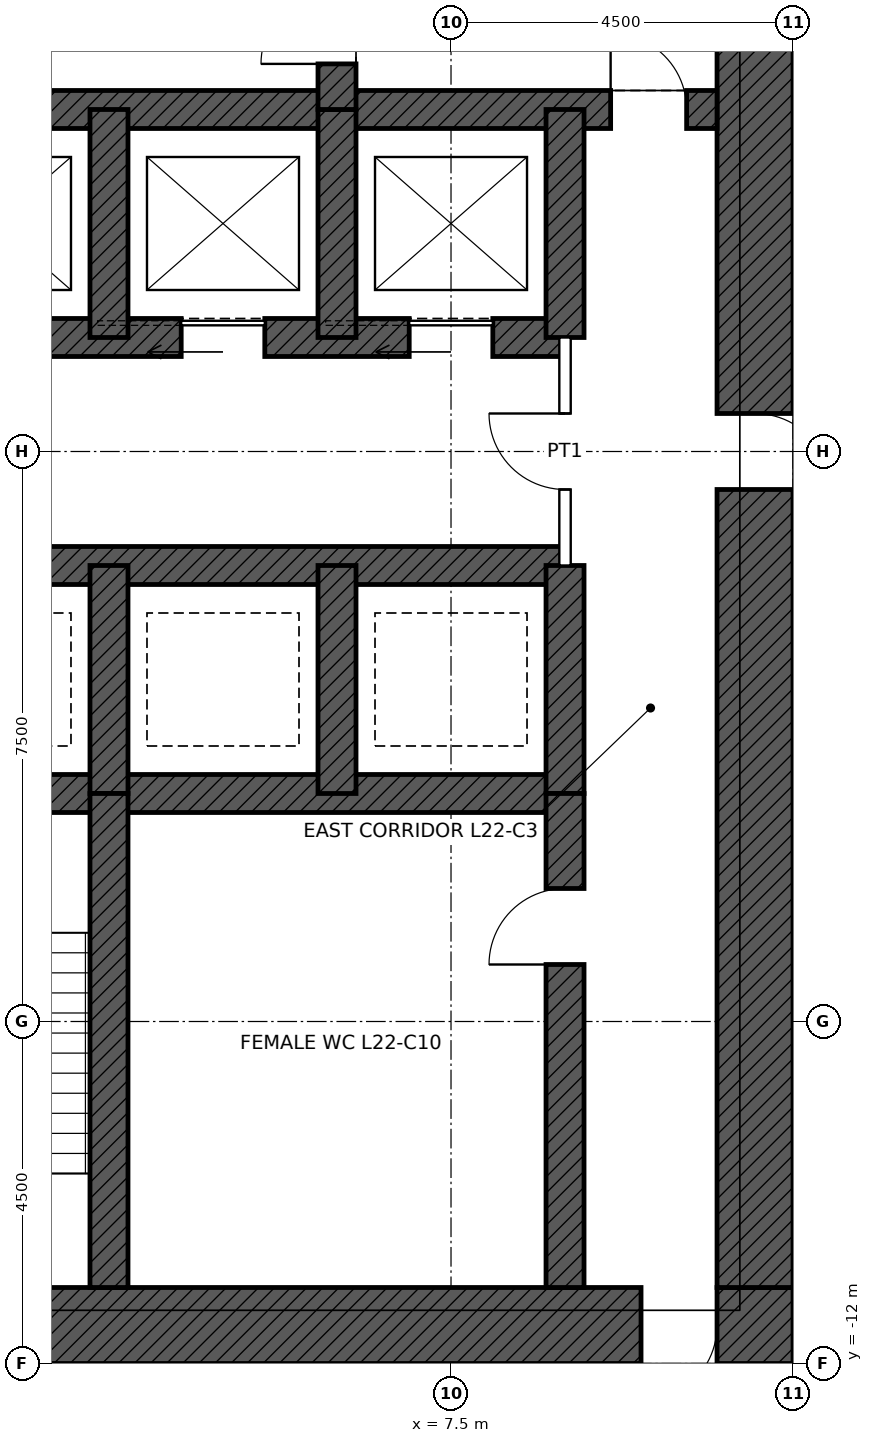
"""IFC4 building model, lengths in metres.
Left out: names, types, materials, properties, quantities, classifications, styles, units other than length and angle.
Written with IfcOpenShell. Run it as: python <this file> out.ifc"""

import sys

from ifc_helpers import new_model, si_unit, direction, frame, frame_2d, origin, place, context, subcontext, project, spatial, rectangle, extrude, element, fill, save


model = new_model("IFC4")
c1 = context("Model", 3, precision=1e-05, world=origin(), true_north=direction((0.0, 1.0)))
c2 = subcontext(c1, "Body", "Model", "MODEL_VIEW")
j1 = project(units=[si_unit("LENGTHUNIT", "METRE"), si_unit("PLANEANGLEUNIT", "RADIAN")], contexts=[c1])
p1 = place(None, origin())
s1 = spatial("IfcSite", under=j1, at=p1, CompositionType="ELEMENT")
p2 = place(p1, origin())
s2 = spatial("IfcBuilding", under=s1, at=p2, CompositionType="ELEMENT")
p3 = place(p2, frame((0.0, 0.0, 113.4)))
s3 = spatial("IfcBuildingStorey", under=s2, at=p3, CompositionType="ELEMENT", Elevation=113.4)
p4 = place(p3, frame((12.0, -11.5, 0.0), z_axis=(0.0, 0.0, 1.0), x_axis=(-1.0, 0.0, 0.0)))
e1 = element("IfcWall", 1, at=p4, inside=s3, PredefinedType="SHEAR", context=c2, shape_type="SweptSolid", body=[
    extrude(rectangle(XDim=24.0, YDim=1.0, at=frame_2d((12.0, 0.0))), origin(), (0.0, 0.0, 1.0), 4.5),
])
p5 = place(p4, frame((11.5, 0.0, 0.0)))
e2 = element("IfcOpeningElement", 2, at=p5, cuts=e1, PredefinedType="OPENING", context=c2, shape_type="SweptSolid", body=[
    extrude(rectangle(XDim=1.0, YDim=2.1, at=frame_2d((0.5, 1.05))), frame((0.0, 0.51, 0.0), z_axis=(0.0, -1.0, 0.0), x_axis=(1.0, 0.0, 0.0)), (0.0, 0.0, 1.0), 1.02),
])
p6 = place(p4, frame((1.0, 0.0, 0.0)))
e3 = element("IfcOpeningElement", 3, at=p6, cuts=e1, PredefinedType="OPENING", context=c2, shape_type="SweptSolid", body=[
    extrude(rectangle(XDim=1.0, YDim=2.4, at=frame_2d((0.5, 1.2))), frame((0.0, 0.51, 0.0), z_axis=(0.0, -1.0, 0.0), x_axis=(1.0, 0.0, 0.0)), (0.0, 0.0, 1.0), 1.02),
])
p7 = place(p3, frame((11.5, 11.0, 0.0), z_axis=(0.0, 0.0, 1.0), x_axis=(0.0, -1.0, 0.0)))
e4 = element("IfcWall", 4, at=p7, inside=s3, PredefinedType="SHEAR", context=c2, shape_type="SweptSolid", body=[
    extrude(rectangle(XDim=22.0, YDim=1.0, at=frame_2d((11.0, 0.0))), origin(), (0.0, 0.0, 1.0), 4.5),
])
p8 = place(p7, frame((10.5, 0.0, 0.0)))
e5 = element("IfcOpeningElement", 5, at=p8, cuts=e4, PredefinedType="OPENING", context=c2, shape_type="SweptSolid", body=[
    extrude(rectangle(XDim=1.0, YDim=2.4, at=frame_2d((0.5, 1.2))), frame((0.0, 0.51, 0.0), z_axis=(0.0, -1.0, 0.0), x_axis=(1.0, 0.0, 0.0)), (0.0, 0.0, 1.0), 1.02),
])
p9 = place(p3, frame((-11.0, 4.5, 0.0), z_axis=(0.0, 0.0, 1.0), x_axis=(1.0, 0.0, 0.0)))
e6 = element("IfcWall", 6, at=p9, inside=s3, PredefinedType="SHEAR", context=c2, shape_type="SweptSolid", body=[
    extrude(rectangle(XDim=22.0, YDim=0.5, at=frame_2d((11.0, 0.0))), origin(), (0.0, 0.0, 1.0), 4.5),
])
p10 = place(p9, frame((0.4, 0.0, 0.0)))
e7 = element("IfcOpeningElement", 7, at=p10, cuts=e6, PredefinedType="OPENING", context=c2, shape_type="SweptSolid", body=[
    extrude(rectangle(XDim=1.0, YDim=2.1, at=frame_2d((0.5, 1.05))), frame((0.0, 0.26, 0.0), z_axis=(0.0, -1.0, 0.0), x_axis=(1.0, 0.0, 0.0)), (0.0, 0.0, 1.0), 0.52),
])
p11 = place(p9, frame((20.6, 0.0, 0.0)))
e8 = element("IfcOpeningElement", 8, at=p11, cuts=e6, PredefinedType="OPENING", context=c2, shape_type="SweptSolid", body=[
    extrude(rectangle(XDim=1.0, YDim=2.1, at=frame_2d((0.5, 1.05))), frame((0.0, 0.26, 0.0), z_axis=(0.0, -1.0, 0.0), x_axis=(1.0, 0.0, 0.0)), (0.0, 0.0, 1.0), 0.52),
])
p12 = place(p3, frame((-9.0, 1.5, 0.0), z_axis=(0.0, 0.0, 1.0), x_axis=(1.0, 0.0, 0.0)))
e9 = element("IfcWall", 9, at=p12, inside=s3, PredefinedType="SHEAR", context=c2, shape_type="SweptSolid", body=[
    extrude(rectangle(XDim=18.0, YDim=0.5, at=frame_2d((9.0, 0.0))), origin(), (0.0, 0.0, 1.0), 4.5),
])
p13 = place(p12, frame((9.95, 0.0, 0.0)))
e10 = element("IfcOpeningElement", 10, at=p13, cuts=e9, PredefinedType="OPENING", context=c2, shape_type="SweptSolid", body=[
    extrude(rectangle(XDim=1.1, YDim=2.1, at=frame_2d((0.55, 1.05))), frame((0.0, 0.26, 0.0), z_axis=(0.0, -1.0, 0.0), x_axis=(1.0, 0.0, 0.0)), (0.0, 0.0, 1.0), 0.52),
])
p14 = place(p12, frame((12.95, 0.0, 0.0)))
e11 = element("IfcOpeningElement", 11, at=p14, cuts=e9, PredefinedType="OPENING", context=c2, shape_type="SweptSolid", body=[
    extrude(rectangle(XDim=1.1, YDim=2.1, at=frame_2d((0.55, 1.05))), frame((0.0, 0.26, 0.0), z_axis=(0.0, -1.0, 0.0), x_axis=(1.0, 0.0, 0.0)), (0.0, 0.0, 1.0), 0.52),
])
p15 = place(p12, frame((15.95, 0.0, 0.0)))
e12 = element("IfcOpeningElement", 12, at=p15, cuts=e9, PredefinedType="OPENING", context=c2, shape_type="SweptSolid", body=[
    extrude(rectangle(XDim=1.1, YDim=2.1, at=frame_2d((0.55, 1.05))), frame((0.0, 0.26, 0.0), z_axis=(0.0, -1.0, 0.0), x_axis=(1.0, 0.0, 0.0)), (0.0, 0.0, 1.0), 0.52),
])
p16 = place(p12, frame((0.95, 0.0, 0.0)))
e13 = element("IfcOpeningElement", 13, at=p16, cuts=e9, PredefinedType="OPENING", context=c2, shape_type="SweptSolid", body=[
    extrude(rectangle(XDim=1.1, YDim=2.1, at=frame_2d((0.55, 1.05))), frame((0.0, 0.26, 0.0), z_axis=(0.0, -1.0, 0.0), x_axis=(1.0, 0.0, 0.0)), (0.0, 0.0, 1.0), 0.52),
])
p17 = place(p12, frame((3.95, 0.0, 0.0)))
e14 = element("IfcOpeningElement", 14, at=p17, cuts=e9, PredefinedType="OPENING", context=c2, shape_type="SweptSolid", body=[
    extrude(rectangle(XDim=1.1, YDim=2.1, at=frame_2d((0.55, 1.05))), frame((0.0, 0.26, 0.0), z_axis=(0.0, -1.0, 0.0), x_axis=(1.0, 0.0, 0.0)), (0.0, 0.0, 1.0), 0.52),
])
p18 = place(p12, frame((6.95, 0.0, 0.0)))
e15 = element("IfcOpeningElement", 15, at=p18, cuts=e9, PredefinedType="OPENING", context=c2, shape_type="SweptSolid", body=[
    extrude(rectangle(XDim=1.1, YDim=2.1, at=frame_2d((0.55, 1.05))), frame((0.0, 0.26, 0.0), z_axis=(0.0, -1.0, 0.0), x_axis=(1.0, 0.0, 0.0)), (0.0, 0.0, 1.0), 0.52),
])
for number, where, z_axis, x_axis in (
    (16, (-9.0, -1.5, 0.0), (0.0, 0.0, 1.0), (1.0, 0.0, 0.0)),
    (17, (-9.0, -4.5, 0.0), (0.0, 0.0, 1.0), (1.0, 0.0, 0.0)),
):
    element("IfcWall", number, at=place(p3, frame(where, z_axis=z_axis, x_axis=x_axis)), inside=s3, PredefinedType="SHEAR", context=c2, shape_type="SweptSolid", body=[
        extrude(rectangle(XDim=18.0, YDim=0.5, at=frame_2d((9.0, 0.0))), origin(), (0.0, 0.0, 1.0), 4.5),
    ])
for number, where, z_axis, x_axis in (
    (18, (9.0, 1.5, 0.0), (0.0, 0.0, 1.0), (0.0, 1.0, 0.0)),
    (19, (9.0, -4.5, 0.0), (0.0, 0.0, 1.0), (0.0, 1.0, 0.0)),
    (20, (3.0, 1.5, 0.0), (0.0, 0.0, 1.0), (0.0, 1.0, 0.0)),
    (21, (6.0, 1.5, 0.0), (0.0, 0.0, 1.0), (0.0, 1.0, 0.0)),
    (22, (3.0, -4.5, 0.0), (0.0, 0.0, 1.0), (0.0, 1.0, 0.0)),
    (23, (6.0, -4.5, 0.0), (0.0, 0.0, 1.0), (0.0, 1.0, 0.0)),
):
    element("IfcWall", number, at=place(p3, frame(where, z_axis=z_axis, x_axis=x_axis)), inside=s3, PredefinedType="SHEAR", context=c2, shape_type="SweptSolid", body=[
        extrude(rectangle(XDim=3.0, YDim=0.5, at=frame_2d((1.5, 0.0))), origin(), (0.0, 0.0, 1.0), 4.5),
    ])
p19 = place(p3, frame((6.0, 4.5, 0.0), z_axis=(0.0, 0.0, 1.0), x_axis=(0.0, 1.0, 0.0)))
e24 = element("IfcWall", 24, at=p19, inside=s3, PredefinedType="SHEAR", context=c2, shape_type="SweptSolid", body=[
    extrude(rectangle(XDim=6.5, YDim=0.5, at=frame_2d((3.25, 0.0))), origin(), (0.0, 0.0, 1.0), 4.5),
])
p20 = place(p19, frame((0.6, 0.0, 0.0)))
e25 = element("IfcOpeningElement", 25, at=p20, cuts=e24, PredefinedType="OPENING", context=c2, shape_type="SweptSolid", body=[
    extrude(rectangle(XDim=1.0, YDim=2.1, at=frame_2d((0.5, 1.05))), frame((0.0, 0.26, 0.0), z_axis=(0.0, -1.0, 0.0), x_axis=(1.0, 0.0, 0.0)), (0.0, 0.0, 1.0), 0.52),
])
p21 = place(p3, frame((9.0, -11.0, 0.0), z_axis=(0.0, 0.0, 1.0), x_axis=(0.0, 1.0, 0.0)))
e26 = element("IfcWall", 26, at=p21, inside=s3, PredefinedType="SHEAR", context=c2, shape_type="SweptSolid", body=[
    extrude(rectangle(XDim=6.5, YDim=0.5, at=frame_2d((3.25, 0.0))), origin(), (0.0, 0.0, 1.0), 4.5),
])
p22 = place(p21, frame((4.25, 0.0, 0.0)))
e27 = element("IfcOpeningElement", 27, at=p22, cuts=e26, PredefinedType="OPENING", context=c2, shape_type="SweptSolid", body=[
    extrude(rectangle(XDim=1.0, YDim=2.1, at=frame_2d((0.5, 1.05))), frame((0.0, 0.26, 0.0), z_axis=(0.0, -1.0, 0.0), x_axis=(1.0, 0.0, 0.0)), (0.0, 0.0, 1.0), 0.52),
])
p23 = place(p3, frame((3.0, -11.0, 0.0), z_axis=(0.0, 0.0, 1.0), x_axis=(0.0, 1.0, 0.0)))
e28 = element("IfcWall", 28, at=p23, inside=s3, PredefinedType="SHEAR", context=c2, shape_type="SweptSolid", body=[
    extrude(rectangle(XDim=6.5, YDim=0.5, at=frame_2d((3.25, 0.0))), origin(), (0.0, 0.0, 1.0), 4.5),
])
p24 = place(p3, frame((9.0, -1.5, 0.0), z_axis=(0.0, 0.0, 1.0), x_axis=(0.0, 1.0, 0.0)))
e29 = element("IfcWall", 29, at=p24, inside=s3, PredefinedType="PARTITIONING", context=c2, shape_type="SweptSolid", body=[
    extrude(rectangle(XDim=3.0, YDim=0.15, at=frame_2d((1.5, 0.0))), origin(), (0.0, 0.0, 1.0), 4.25),
])
p25 = place(p24, frame((1.0, 0.0, 0.0)))
e30 = element("IfcOpeningElement", 30, at=p25, cuts=e29, PredefinedType="OPENING", context=c2, shape_type="SweptSolid", body=[
    extrude(rectangle(XDim=1.0, YDim=2.4, at=frame_2d((0.5, 1.2))), frame((0.0, 0.085, 0.0), z_axis=(0.0, -1.0, 0.0), x_axis=(1.0, 0.0, 0.0)), (0.0, 0.0, 1.0), 0.17),
])
p26 = place(p11, origin())
e31 = element("IfcDoor", 31, at=p26, inside=s3, OperationType="SINGLE_SWING_LEFT", PredefinedType="DOOR", context=c2, shape_type="SweptSolid", body=[
    extrude(rectangle(XDim=1.0, YDim=2.1, at=frame_2d((0.5, 1.05))), frame((0.0, 0.025, 0.0), z_axis=(0.0, -1.0, 0.0), x_axis=(1.0, 0.0, 0.0)), (0.0, 0.0, 1.0), 0.05),
])
fill(e8, e31)
p27 = place(p20, origin())
e32 = element("IfcDoor", 32, at=p27, inside=s3, OperationType="SINGLE_SWING_LEFT", PredefinedType="DOOR", context=c2, shape_type="SweptSolid", body=[
    extrude(rectangle(XDim=1.0, YDim=2.1, at=frame_2d((0.5, 1.05))), frame((0.0, 0.025, 0.0), z_axis=(0.0, -1.0, 0.0), x_axis=(1.0, 0.0, 0.0)), (0.0, 0.0, 1.0), 0.05),
])
fill(e25, e32)
p28 = place(p8, origin())
e33 = element("IfcDoor", 33, at=p28, inside=s3, OperationType="SINGLE_SWING_RIGHT", PredefinedType="DOOR", context=c2, shape_type="SweptSolid", body=[
    extrude(rectangle(XDim=1.0, YDim=2.4, at=frame_2d((0.5, 1.2))), frame((0.0, 0.485, 0.0), z_axis=(0.0, -1.0, 0.0), x_axis=(1.0, 0.0, 0.0)), (0.0, 0.0, 1.0), 0.05),
])
fill(e5, e33)
p29 = place(p6, origin())
e34 = element("IfcDoor", 34, at=p29, inside=s3, OperationType="SINGLE_SWING_RIGHT", PredefinedType="DOOR", context=c2, shape_type="SweptSolid", body=[
    extrude(rectangle(XDim=1.0, YDim=2.4, at=frame_2d((0.5, 1.2))), frame((0.0, 0.485, 0.0), z_axis=(0.0, -1.0, 0.0), x_axis=(1.0, 0.0, 0.0)), (0.0, 0.0, 1.0), 0.05),
])
fill(e3, e34)
p30 = place(p22, origin())
e35 = element("IfcDoor", 35, at=p30, inside=s3, OperationType="SINGLE_SWING_LEFT", PredefinedType="DOOR", context=c2, shape_type="SweptSolid", body=[
    extrude(rectangle(XDim=1.0, YDim=2.1, at=frame_2d((0.5, 1.05))), frame((0.0, 0.025, 0.0), z_axis=(0.0, -1.0, 0.0), x_axis=(1.0, 0.0, 0.0)), (0.0, 0.0, 1.0), 0.05),
])
fill(e27, e35)
p31 = place(p14, origin())
e36 = element("IfcDoor", 36, at=p31, inside=s3, OperationType="SLIDING_TO_LEFT", PredefinedType="DOOR", context=c2, shape_type="SweptSolid", body=[
    extrude(rectangle(XDim=1.1, YDim=2.1, at=frame_2d((0.55, 1.05))), frame((0.0, 0.025, 0.0), z_axis=(0.0, -1.0, 0.0), x_axis=(1.0, 0.0, 0.0)), (0.0, 0.0, 1.0), 0.05),
])
fill(e11, e36)
p32 = place(p15, origin())
e37 = element("IfcDoor", 37, at=p32, inside=s3, OperationType="SLIDING_TO_LEFT", PredefinedType="DOOR", context=c2, shape_type="SweptSolid", body=[
    extrude(rectangle(XDim=1.1, YDim=2.1, at=frame_2d((0.55, 1.05))), frame((0.0, 0.025, 0.0), z_axis=(0.0, -1.0, 0.0), x_axis=(1.0, 0.0, 0.0)), (0.0, 0.0, 1.0), 0.05),
])
fill(e12, e37)
p33 = place(p25, origin())
e38 = element("IfcDoor", 38, at=p33, inside=s3, OperationType="SINGLE_SWING_RIGHT", PredefinedType="DOOR", context=c2, shape_type="SweptSolid", body=[
    extrude(rectangle(XDim=1.0, YDim=2.4, at=frame_2d((0.5, 1.2))), frame((0.0, 0.025, 0.0), z_axis=(0.0, -1.0, 0.0), x_axis=(1.0, 0.0, 0.0)), (0.0, 0.0, 1.0), 0.05),
])
fill(e30, e38)
save(model, sys.argv[1])
